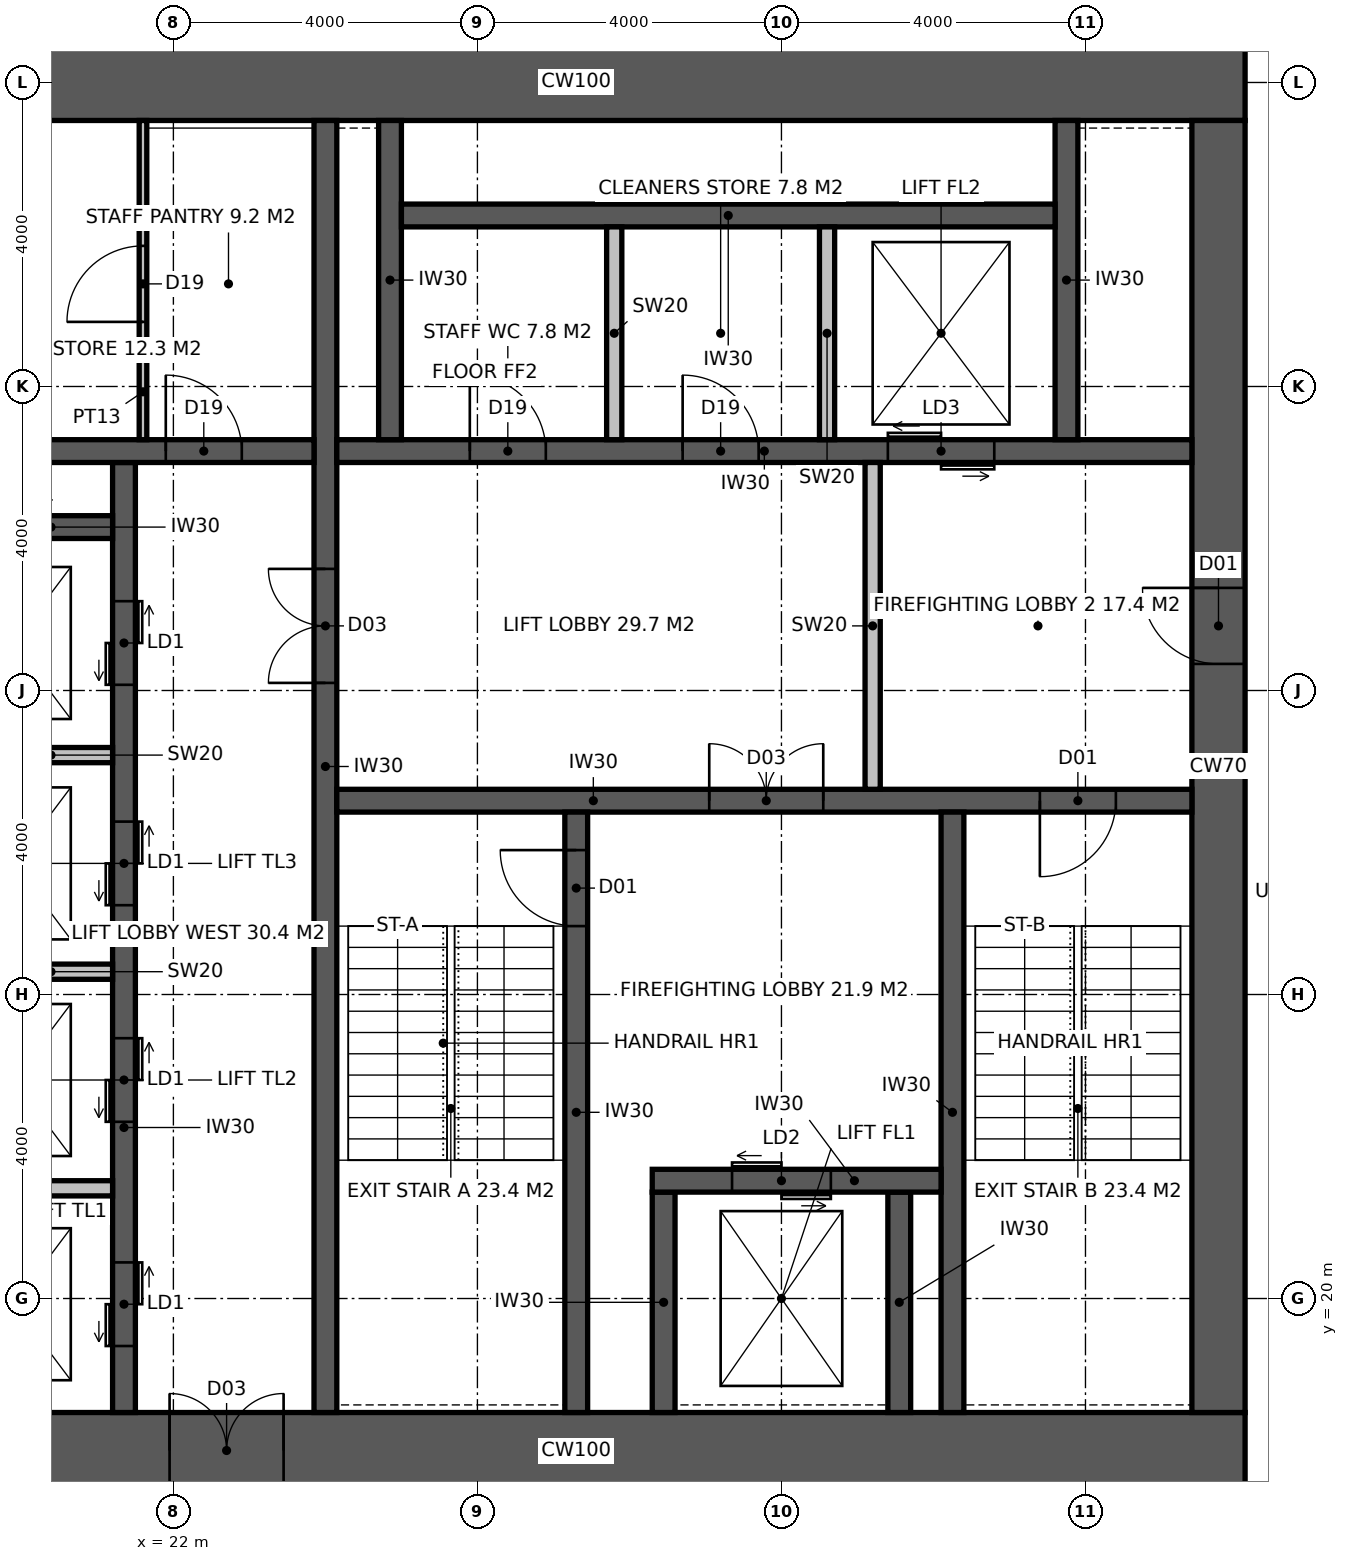
"""IFC4 building model, lengths in metres.
Left out: names, types, materials, properties, quantities, classifications, styles, units other than length and angle.
Written with IfcOpenShell. Run it as: python <this file> out.ifc"""

import sys

from ifc_helpers import new_model, si_unit, direction, frame, frame_2d, origin, place, context, subcontext, project, spatial, rectangle, extrude, element, fill, save


model = new_model("IFC4")
c1 = context("Model", 3, precision=1e-05, world=origin(), true_north=direction((0.0, 1.0)))
c2 = subcontext(c1, "Body", "Model", "MODEL_VIEW")
j1 = project(units=[si_unit("LENGTHUNIT", "METRE"), si_unit("PLANEANGLEUNIT", "RADIAN")], contexts=[c1])
p1 = place(None, origin())
s1 = spatial("IfcSite", under=j1, at=p1, CompositionType="ELEMENT")
p2 = place(p1, origin())
s2 = spatial("IfcBuilding", under=s1, at=p2, CompositionType="ELEMENT")
p3 = place(p2, frame((0.0, 0.0, 274.2)))
s3 = spatial("IfcBuildingStorey", under=s2, at=p3, CompositionType="ELEMENT", Elevation=274.2)
p4 = place(p3, frame((18.5, 18.0, -0.15), z_axis=(0.0, 0.0, 1.0), x_axis=(1.0, 0.0, 0.0)))
e1 = element("IfcWall", 1, at=p4, inside=s3, PredefinedType="SHEAR", context=c2, shape_type="SweptSolid", body=[
    extrude(rectangle(XDim=17.6, YDim=1.0, at=frame_2d((8.8, 0.0))), origin(), (0.0, 0.0, 1.0), 4.0),
])
p5 = place(p4, frame((3.45, 0.0, 0.15)))
e2 = element("IfcOpeningElement", 2, at=p5, cuts=e1, PredefinedType="OPENING", context=c2, shape_type="SweptSolid", body=[
    extrude(rectangle(XDim=1.5, YDim=2.4, at=frame_2d((0.75, 1.2))), frame((0.0, 0.51, 0.0), z_axis=(0.0, -1.0, 0.0), x_axis=(1.0, 0.0, 0.0)), (0.0, 0.0, 1.0), 1.02),
])
p6 = place(p3, frame((18.5, 36.0, -0.15), z_axis=(0.0, 0.0, 1.0), x_axis=(1.0, 0.0, 0.0)))
e3 = element("IfcWall", 3, at=p6, inside=s3, PredefinedType="SHEAR", context=c2, shape_type="SweptSolid", body=[
    extrude(rectangle(XDim=17.6, YDim=1.0, at=frame_2d((8.8, 0.0))), origin(), (0.0, 0.0, 1.0), 4.0),
])
p7 = place(p3, frame((35.75, 18.5, -0.15), z_axis=(0.0, 0.0, 1.0), x_axis=(0.0, 1.0, 0.0)))
e4 = element("IfcWall", 4, at=p7, inside=s3, PredefinedType="SHEAR", context=c2, shape_type="SweptSolid", body=[
    extrude(rectangle(XDim=17.0, YDim=0.7, at=frame_2d((8.5, 0.0))), origin(), (0.0, 0.0, 1.0), 4.0),
])
p8 = place(p7, frame((9.85, 0.0, 0.15)))
e5 = element("IfcOpeningElement", 5, at=p8, cuts=e4, PredefinedType="OPENING", context=c2, shape_type="SweptSolid", body=[
    extrude(rectangle(XDim=1.0, YDim=2.2, at=frame_2d((0.5, 1.1))), frame((0.0, 0.36, 0.0), z_axis=(0.0, -1.0, 0.0), x_axis=(1.0, 0.0, 0.0)), (0.0, 0.0, 1.0), 0.72),
])
p9 = place(p3, frame((24.0, 18.5, -0.15), z_axis=(0.0, 0.0, 1.0), x_axis=(0.0, 1.0, 0.0)))
e6 = element("IfcWall", 6, at=p9, inside=s3, PredefinedType="SHEAR", context=c2, shape_type="SweptSolid", body=[
    extrude(rectangle(XDim=17.0, YDim=0.3, at=frame_2d((8.5, 0.0))), origin(), (0.0, 0.0, 1.0), 4.0),
])
p10 = place(p9, frame((9.6, 0.0, 0.15)))
e7 = element("IfcOpeningElement", 7, at=p10, cuts=e6, PredefinedType="OPENING", context=c2, shape_type="SweptSolid", body=[
    extrude(rectangle(XDim=1.5, YDim=2.4, at=frame_2d((0.75, 1.2))), frame((0.0, 0.16, 0.0), z_axis=(0.0, -1.0, 0.0), x_axis=(1.0, 0.0, 0.0)), (0.0, 0.0, 1.0), 0.32),
])
p11 = place(p3, frame((24.15, 26.55, -0.15), z_axis=(0.0, 0.0, 1.0), x_axis=(1.0, 0.0, 0.0)))
e8 = element("IfcWall", 8, at=p11, inside=s3, PredefinedType="SHEAR", context=c2, shape_type="SweptSolid", body=[
    extrude(rectangle(XDim=11.25, YDim=0.3, at=frame_2d((5.625, 0.0))), origin(), (0.0, 0.0, 1.0), 4.0),
])
p12 = place(p11, frame((9.25, 0.0, 0.15)))
e9 = element("IfcOpeningElement", 9, at=p12, cuts=e8, PredefinedType="OPENING", context=c2, shape_type="SweptSolid", body=[
    extrude(rectangle(XDim=1.0, YDim=2.2, at=frame_2d((0.5, 1.1))), frame((0.0, 0.16, 0.0), z_axis=(0.0, -1.0, 0.0), x_axis=(1.0, 0.0, 0.0)), (0.0, 0.0, 1.0), 0.32),
])
p13 = place(p11, frame((4.9, 0.0, 0.15)))
e10 = element("IfcOpeningElement", 10, at=p13, cuts=e8, PredefinedType="OPENING", context=c2, shape_type="SweptSolid", body=[
    extrude(rectangle(XDim=1.5, YDim=2.4, at=frame_2d((0.75, 1.2))), frame((0.0, 0.16, 0.0), z_axis=(0.0, -1.0, 0.0), x_axis=(1.0, 0.0, 0.0)), (0.0, 0.0, 1.0), 0.32),
])
p14 = place(p3, frame((27.3, 18.5, -0.15), z_axis=(0.0, 0.0, 1.0), x_axis=(0.0, 1.0, 0.0)))
e11 = element("IfcWall", 11, at=p14, inside=s3, PredefinedType="SHEAR", context=c2, shape_type="SweptSolid", body=[
    extrude(rectangle(XDim=7.9, YDim=0.3, at=frame_2d((3.95, 0.0))), origin(), (0.0, 0.0, 1.0), 4.0),
])
p15 = place(p14, frame((6.4, 0.0, 0.15)))
e12 = element("IfcOpeningElement", 12, at=p15, cuts=e11, PredefinedType="OPENING", context=c2, shape_type="SweptSolid", body=[
    extrude(rectangle(XDim=1.0, YDim=2.2, at=frame_2d((0.5, 1.1))), frame((0.0, 0.16, 0.0), z_axis=(0.0, -1.0, 0.0), x_axis=(1.0, 0.0, 0.0)), (0.0, 0.0, 1.0), 0.32),
])
p16 = place(p3, frame((32.25, 18.5, -0.15), z_axis=(0.0, 0.0, 1.0), x_axis=(0.0, 1.0, 0.0)))
e13 = element("IfcWall", 13, at=p16, inside=s3, PredefinedType="SHEAR", context=c2, shape_type="SweptSolid", body=[
    extrude(rectangle(XDim=7.9, YDim=0.3, at=frame_2d((3.95, 0.0))), origin(), (0.0, 0.0, 1.0), 4.0),
])
for number, where, z_axis, x_axis in (
    (14, (28.45, 18.5, -0.15), (0.0, 0.0, 1.0), (0.0, 1.0, 0.0)),
    (15, (31.55, 18.5, -0.15), (0.0, 0.0, 1.0), (0.0, 1.0, 0.0)),
):
    element("IfcWall", number, at=place(p3, frame(where, z_axis=z_axis, x_axis=x_axis)), inside=s3, PredefinedType="SHEAR", context=c2, shape_type="SweptSolid", body=[
        extrude(rectangle(XDim=2.9, YDim=0.3, at=frame_2d((1.45, 0.0))), origin(), (0.0, 0.0, 1.0), 4.0),
    ])
p17 = place(p3, frame((28.3, 21.55, -0.15), z_axis=(0.0, 0.0, 1.0), x_axis=(1.0, 0.0, 0.0)))
e16 = element("IfcWall", 16, at=p17, inside=s3, PredefinedType="SHEAR", context=c2, shape_type="SweptSolid", body=[
    extrude(rectangle(XDim=3.8, YDim=0.3, at=frame_2d((1.9, 0.0))), origin(), (0.0, 0.0, 1.0), 4.0),
])
p18 = place(p17, frame((1.05, 0.0, 0.15)))
e17 = element("IfcOpeningElement", 17, at=p18, cuts=e16, PredefinedType="OPENING", context=c2, shape_type="SweptSolid", body=[
    extrude(rectangle(XDim=1.3, YDim=2.4, at=frame_2d((0.65, 1.2))), frame((0.0, 0.16, 0.0), z_axis=(0.0, -1.0, 0.0), x_axis=(1.0, 0.0, 0.0)), (0.0, 0.0, 1.0), 0.32),
])
p19 = place(p3, frame((24.15, 31.15, -0.15), z_axis=(0.0, 0.0, 1.0), x_axis=(1.0, 0.0, 0.0)))
e18 = element("IfcWall", 18, at=p19, inside=s3, PredefinedType="SHEAR", context=c2, shape_type="SweptSolid", body=[
    extrude(rectangle(XDim=11.25, YDim=0.3, at=frame_2d((5.625, 0.0))), origin(), (0.0, 0.0, 1.0), 4.0),
])
p20 = place(p19, frame((1.75, 0.0, 0.15)))
e19 = element("IfcOpeningElement", 19, at=p20, cuts=e18, PredefinedType="OPENING", context=c2, shape_type="SweptSolid", body=[
    extrude(rectangle(XDim=1.0, YDim=2.2, at=frame_2d((0.5, 1.1))), frame((0.0, 0.16, 0.0), z_axis=(0.0, -1.0, 0.0), x_axis=(1.0, 0.0, 0.0)), (0.0, 0.0, 1.0), 0.32),
])
p21 = place(p19, frame((4.55, 0.0, 0.15)))
e20 = element("IfcOpeningElement", 20, at=p21, cuts=e18, PredefinedType="OPENING", context=c2, shape_type="SweptSolid", body=[
    extrude(rectangle(XDim=1.0, YDim=2.2, at=frame_2d((0.5, 1.1))), frame((0.0, 0.16, 0.0), z_axis=(0.0, -1.0, 0.0), x_axis=(1.0, 0.0, 0.0)), (0.0, 0.0, 1.0), 0.32),
])
p22 = place(p19, frame((7.25, 0.0, 0.15)))
e21 = element("IfcOpeningElement", 21, at=p22, cuts=e18, PredefinedType="OPENING", context=c2, shape_type="SweptSolid", body=[
    extrude(rectangle(XDim=1.4, YDim=2.4, at=frame_2d((0.7, 1.2))), frame((0.0, 0.16, 0.0), z_axis=(0.0, -1.0, 0.0), x_axis=(1.0, 0.0, 0.0)), (0.0, 0.0, 1.0), 0.32),
])
p23 = place(p3, frame((21.35, 18.5, -0.15), z_axis=(0.0, 0.0, 1.0), x_axis=(0.0, 1.0, 0.0)))
e22 = element("IfcWall", 22, at=p23, inside=s3, PredefinedType="SHEAR", context=c2, shape_type="SweptSolid", body=[
    extrude(rectangle(XDim=12.5, YDim=0.3, at=frame_2d((6.25, 0.0))), origin(), (0.0, 0.0, 1.0), 4.0),
])
p24 = place(p23, frame((0.875, 0.0, 0.15)))
e23 = element("IfcOpeningElement", 23, at=p24, cuts=e22, PredefinedType="OPENING", context=c2, shape_type="SweptSolid", body=[
    extrude(rectangle(XDim=1.1, YDim=2.2, at=frame_2d((0.55, 1.1))), frame((0.0, 0.16, 0.0), z_axis=(0.0, -1.0, 0.0), x_axis=(1.0, 0.0, 0.0)), (0.0, 0.0, 1.0), 0.32),
])
p25 = place(p23, frame((3.825, 0.0, 0.15)))
e24 = element("IfcOpeningElement", 24, at=p25, cuts=e22, PredefinedType="OPENING", context=c2, shape_type="SweptSolid", body=[
    extrude(rectangle(XDim=1.1, YDim=2.2, at=frame_2d((0.55, 1.1))), frame((0.0, 0.16, 0.0), z_axis=(0.0, -1.0, 0.0), x_axis=(1.0, 0.0, 0.0)), (0.0, 0.0, 1.0), 0.32),
])
p26 = place(p23, frame((6.675, 0.0, 0.15)))
e25 = element("IfcOpeningElement", 25, at=p26, cuts=e22, PredefinedType="OPENING", context=c2, shape_type="SweptSolid", body=[
    extrude(rectangle(XDim=1.1, YDim=2.2, at=frame_2d((0.55, 1.1))), frame((0.0, 0.16, 0.0), z_axis=(0.0, -1.0, 0.0), x_axis=(1.0, 0.0, 0.0)), (0.0, 0.0, 1.0), 0.32),
])
p27 = place(p23, frame((9.575, 0.0, 0.15)))
e26 = element("IfcOpeningElement", 26, at=p27, cuts=e22, PredefinedType="OPENING", context=c2, shape_type="SweptSolid", body=[
    extrude(rectangle(XDim=1.1, YDim=2.2, at=frame_2d((0.55, 1.1))), frame((0.0, 0.16, 0.0), z_axis=(0.0, -1.0, 0.0), x_axis=(1.0, 0.0, 0.0)), (0.0, 0.0, 1.0), 0.32),
])
p28 = place(p3, frame((18.5, 31.15, -0.15), z_axis=(0.0, 0.0, 1.0), x_axis=(1.0, 0.0, 0.0)))
e27 = element("IfcWall", 27, at=p28, inside=s3, PredefinedType="SHEAR", context=c2, shape_type="SweptSolid", body=[
    extrude(rectangle(XDim=5.35, YDim=0.3, at=frame_2d((2.675, 0.0))), origin(), (0.0, 0.0, 1.0), 4.0),
])
p29 = place(p28, frame((3.4, 0.0, 0.15)))
e28 = element("IfcOpeningElement", 28, at=p29, cuts=e27, PredefinedType="OPENING", context=c2, shape_type="SweptSolid", body=[
    extrude(rectangle(XDim=1.0, YDim=2.2, at=frame_2d((0.5, 1.1))), frame((0.0, 0.16, 0.0), z_axis=(0.0, -1.0, 0.0), x_axis=(1.0, 0.0, 0.0)), (0.0, 0.0, 1.0), 0.32),
])
p30 = place(p3, frame((18.5, 30.15, -0.15), z_axis=(0.0, 0.0, 1.0), x_axis=(1.0, 0.0, 0.0)))
e29 = element("IfcWall", 29, at=p30, inside=s3, PredefinedType="SHEAR", context=c2, shape_type="SweptSolid", body=[
    extrude(rectangle(XDim=2.7, YDim=0.3, at=frame_2d((1.35, 0.0))), origin(), (0.0, 0.0, 1.0), 4.0),
])
for number, where, z_axis, x_axis in (
    (30, (24.85, 31.3, -0.15), (0.0, 0.0, 1.0), (0.0, 1.0, 0.0)),
    (31, (33.75, 31.3, -0.15), (0.0, 0.0, 1.0), (0.0, 1.0, 0.0)),
):
    element("IfcWall", number, at=place(p3, frame(where, z_axis=z_axis, x_axis=x_axis)), inside=s3, PredefinedType="SHEAR", context=c2, shape_type="SweptSolid", body=[
        extrude(rectangle(XDim=4.2, YDim=0.3, at=frame_2d((2.1, 0.0))), origin(), (0.0, 0.0, 1.0), 4.0),
    ])
p31 = place(p3, frame((25.0, 34.25, -0.15), z_axis=(0.0, 0.0, 1.0), x_axis=(1.0, 0.0, 0.0)))
e32 = element("IfcWall", 32, at=p31, inside=s3, PredefinedType="SHEAR", context=c2, shape_type="SweptSolid", body=[
    extrude(rectangle(XDim=8.6, YDim=0.3, at=frame_2d((4.3, 0.0))), origin(), (0.0, 0.0, 1.0), 4.0),
])
p32 = place(p3, frame((27.8, 31.3, 0.0), z_axis=(0.0, 0.0, 1.0), x_axis=(0.0, 1.0, 0.0)))
e33 = element("IfcWall", 33, at=p32, inside=s3, PredefinedType="SOLIDWALL", context=c2, shape_type="SweptSolid", body=[
    extrude(rectangle(XDim=2.8, YDim=0.2, at=frame_2d((1.4, 0.0))), origin(), (0.0, 0.0, 1.0), 3.85),
])
p33 = place(p3, frame((30.6, 31.3, -0.15), z_axis=(0.0, 0.0, 1.0), x_axis=(0.0, 1.0, 0.0)))
e34 = element("IfcWall", 34, at=p33, inside=s3, PredefinedType="SOLIDWALL", context=c2, shape_type="SweptSolid", body=[
    extrude(rectangle(XDim=2.8, YDim=0.2, at=frame_2d((1.4, 0.0))), origin(), (0.0, 0.0, 1.0), 4.0),
])
for number, where, z_axis, x_axis in (
    (35, (18.5, 21.45, -0.15), (0.0, 0.0, 1.0), (1.0, 0.0, 0.0)),
    (36, (18.5, 24.3, -0.15), (0.0, 0.0, 1.0), (1.0, 0.0, 0.0)),
    (37, (18.5, 27.15, -0.15), (0.0, 0.0, 1.0), (1.0, 0.0, 0.0)),
):
    element("IfcWall", number, at=place(p3, frame(where, z_axis=z_axis, x_axis=x_axis)), inside=s3, PredefinedType="SOLIDWALL", context=c2, shape_type="SweptSolid", body=[
        extrude(rectangle(XDim=2.7, YDim=0.2, at=frame_2d((1.35, 0.0))), origin(), (0.0, 0.0, 1.0), 4.0),
    ])
p34 = place(p3, frame((31.2, 26.7, 0.0), z_axis=(0.0, 0.0, 1.0), x_axis=(0.0, 1.0, 0.0)))
e38 = element("IfcWall", 38, at=p34, inside=s3, PredefinedType="SOLIDWALL", context=c2, shape_type="SweptSolid", body=[
    extrude(rectangle(XDim=4.3, YDim=0.2, at=frame_2d((2.15, 0.0))), origin(), (0.0, 0.0, 1.0), 3.85),
])
p35 = place(p3, frame((21.6, 31.3, 0.0), z_axis=(0.0, 0.0, 1.0), x_axis=(0.0, 1.0, 0.0)))
e39 = element("IfcWall", 39, at=p35, inside=s3, PredefinedType="PARTITIONING", context=c2, shape_type="SweptSolid", body=[
    extrude(rectangle(XDim=4.2, YDim=0.1, at=frame_2d((2.1, 0.0))), origin(), (0.0, 0.0, 1.0), 3.85),
])
p36 = place(p35, frame((1.55, 0.0, 0.0)))
e40 = element("IfcOpeningElement", 40, at=p36, cuts=e39, PredefinedType="OPENING", context=c2, shape_type="SweptSolid", body=[
    extrude(rectangle(XDim=1.0, YDim=2.2, at=frame_2d((0.5, 1.1))), frame((0.0, 0.06, 0.0), z_axis=(0.0, -1.0, 0.0), x_axis=(1.0, 0.0, 0.0)), (0.0, 0.0, 1.0), 0.12),
])
p37 = place(p15, origin())
e41 = element("IfcDoor", 41, at=p37, inside=s3, OperationType="SINGLE_SWING_RIGHT", PredefinedType="DOOR", context=c2, shape_type="SweptSolid", body=[
    extrude(rectangle(XDim=1.0, YDim=2.2, at=frame_2d((0.5, 1.1))), frame((0.0, 0.025, 0.0), z_axis=(0.0, -1.0, 0.0), x_axis=(1.0, 0.0, 0.0)), (0.0, 0.0, 1.0), 0.05),
])
fill(e12, e41)
p38 = place(p12, frame((1.0, 0.0, 0.0), z_axis=(0.0, 0.0, 1.0), x_axis=(-1.0, 0.0, 0.0)))
e42 = element("IfcDoor", 42, at=p38, inside=s3, OperationType="SINGLE_SWING_RIGHT", PredefinedType="DOOR", context=c2, shape_type="SweptSolid", body=[
    extrude(rectangle(XDim=1.0, YDim=2.2, at=frame_2d((0.5, 1.1))), frame((0.0, 0.025, 0.0), z_axis=(0.0, -1.0, 0.0), x_axis=(1.0, 0.0, 0.0)), (0.0, 0.0, 1.0), 0.05),
])
fill(e9, e42)
p39 = place(p8, origin())
e43 = element("IfcDoor", 43, at=p39, inside=s3, OperationType="SINGLE_SWING_RIGHT", PredefinedType="DOOR", context=c2, shape_type="SweptSolid", body=[
    extrude(rectangle(XDim=1.0, YDim=2.2, at=frame_2d((0.5, 1.1))), frame((0.0, 0.025, 0.0), z_axis=(0.0, -1.0, 0.0), x_axis=(1.0, 0.0, 0.0)), (0.0, 0.0, 1.0), 0.05),
])
fill(e5, e43)
p40 = place(p13, origin())
e44 = element("IfcDoor", 44, at=p40, inside=s3, OperationType="DOUBLE_DOOR_DOUBLE_SWING", PredefinedType="DOOR", context=c2, shape_type="SweptSolid", body=[
    extrude(rectangle(XDim=1.5, YDim=2.4, at=frame_2d((0.75, 1.2))), frame((0.0, 0.025, 0.0), z_axis=(0.0, -1.0, 0.0), x_axis=(1.0, 0.0, 0.0)), (0.0, 0.0, 1.0), 0.05),
])
fill(e10, e44)
p41 = place(p10, origin())
e45 = element("IfcDoor", 45, at=p41, inside=s3, OperationType="DOUBLE_DOOR_DOUBLE_SWING", PredefinedType="DOOR", context=c2, shape_type="SweptSolid", body=[
    extrude(rectangle(XDim=1.5, YDim=2.4, at=frame_2d((0.75, 1.2))), frame((0.0, 0.025, 0.0), z_axis=(0.0, -1.0, 0.0), x_axis=(1.0, 0.0, 0.0)), (0.0, 0.0, 1.0), 0.05),
])
fill(e7, e45)
p42 = place(p29, origin())
e46 = element("IfcDoor", 46, at=p42, inside=s3, OperationType="SINGLE_SWING_LEFT", PredefinedType="DOOR", context=c2, shape_type="SweptSolid", body=[
    extrude(rectangle(XDim=1.0, YDim=2.2, at=frame_2d((0.5, 1.1))), frame((0.0, 0.025, 0.0), z_axis=(0.0, -1.0, 0.0), x_axis=(1.0, 0.0, 0.0)), (0.0, 0.0, 1.0), 0.05),
])
fill(e28, e46)
p43 = place(p36, origin())
e47 = element("IfcDoor", 47, at=p43, inside=s3, OperationType="SINGLE_SWING_LEFT", PredefinedType="DOOR", context=c2, shape_type="SweptSolid", body=[
    extrude(rectangle(XDim=1.0, YDim=2.2, at=frame_2d((0.5, 1.1))), frame((0.0, 0.025, 0.0), z_axis=(0.0, -1.0, 0.0), x_axis=(1.0, 0.0, 0.0)), (0.0, 0.0, 1.0), 0.05),
])
fill(e40, e47)
p44 = place(p20, origin())
e48 = element("IfcDoor", 48, at=p44, inside=s3, OperationType="SINGLE_SWING_LEFT", PredefinedType="DOOR", context=c2, shape_type="SweptSolid", body=[
    extrude(rectangle(XDim=1.0, YDim=2.2, at=frame_2d((0.5, 1.1))), frame((0.0, 0.025, 0.0), z_axis=(0.0, -1.0, 0.0), x_axis=(1.0, 0.0, 0.0)), (0.0, 0.0, 1.0), 0.05),
])
fill(e19, e48)
p45 = place(p21, origin())
e49 = element("IfcDoor", 49, at=p45, inside=s3, OperationType="SINGLE_SWING_LEFT", PredefinedType="DOOR", context=c2, shape_type="SweptSolid", body=[
    extrude(rectangle(XDim=1.0, YDim=2.2, at=frame_2d((0.5, 1.1))), frame((0.0, 0.025, 0.0), z_axis=(0.0, -1.0, 0.0), x_axis=(1.0, 0.0, 0.0)), (0.0, 0.0, 1.0), 0.05),
])
fill(e20, e49)
p46 = place(p5, origin())
e50 = element("IfcDoor", 50, at=p46, inside=s3, OperationType="DOUBLE_DOOR_DOUBLE_SWING", PredefinedType="DOOR", context=c2, shape_type="SweptSolid", body=[
    extrude(rectangle(XDim=1.5, YDim=2.4, at=frame_2d((0.75, 1.2))), frame((0.0, 0.025, 0.0), z_axis=(0.0, -1.0, 0.0), x_axis=(1.0, 0.0, 0.0)), (0.0, 0.0, 1.0), 0.05),
])
fill(e2, e50)
p47 = place(p18, origin())
e51 = element("IfcDoor", 51, at=p47, inside=s3, OperationType="DOUBLE_DOOR_SLIDING", PredefinedType="DOOR", context=c2, shape_type="SweptSolid", body=[
    extrude(rectangle(XDim=1.3, YDim=2.4, at=frame_2d((0.65, 1.2))), frame((0.0, 0.025, 0.0), z_axis=(0.0, -1.0, 0.0), x_axis=(1.0, 0.0, 0.0)), (0.0, 0.0, 1.0), 0.05),
])
fill(e17, e51)
p48 = place(p22, origin())
e52 = element("IfcDoor", 52, at=p48, inside=s3, OperationType="DOUBLE_DOOR_SLIDING", PredefinedType="DOOR", context=c2, shape_type="SweptSolid", body=[
    extrude(rectangle(XDim=1.4, YDim=2.4, at=frame_2d((0.7, 1.2))), frame((0.0, 0.025, 0.0), z_axis=(0.0, -1.0, 0.0), x_axis=(1.0, 0.0, 0.0)), (0.0, 0.0, 1.0), 0.05),
])
fill(e21, e52)
p49 = place(p24, origin())
e53 = element("IfcDoor", 53, at=p49, inside=s3, OperationType="DOUBLE_DOOR_SLIDING", PredefinedType="DOOR", context=c2, shape_type="SweptSolid", body=[
    extrude(rectangle(XDim=1.1, YDim=2.2, at=frame_2d((0.55, 1.1))), frame((0.0, 0.025, 0.0), z_axis=(0.0, -1.0, 0.0), x_axis=(1.0, 0.0, 0.0)), (0.0, 0.0, 1.0), 0.05),
])
fill(e23, e53)
p50 = place(p25, origin())
e54 = element("IfcDoor", 54, at=p50, inside=s3, OperationType="DOUBLE_DOOR_SLIDING", PredefinedType="DOOR", context=c2, shape_type="SweptSolid", body=[
    extrude(rectangle(XDim=1.1, YDim=2.2, at=frame_2d((0.55, 1.1))), frame((0.0, 0.025, 0.0), z_axis=(0.0, -1.0, 0.0), x_axis=(1.0, 0.0, 0.0)), (0.0, 0.0, 1.0), 0.05),
])
fill(e24, e54)
p51 = place(p26, origin())
e55 = element("IfcDoor", 55, at=p51, inside=s3, OperationType="DOUBLE_DOOR_SLIDING", PredefinedType="DOOR", context=c2, shape_type="SweptSolid", body=[
    extrude(rectangle(XDim=1.1, YDim=2.2, at=frame_2d((0.55, 1.1))), frame((0.0, 0.025, 0.0), z_axis=(0.0, -1.0, 0.0), x_axis=(1.0, 0.0, 0.0)), (0.0, 0.0, 1.0), 0.05),
])
fill(e25, e55)
p52 = place(p27, origin())
e56 = element("IfcDoor", 56, at=p52, inside=s3, OperationType="DOUBLE_DOOR_SLIDING", PredefinedType="DOOR", context=c2, shape_type="SweptSolid", body=[
    extrude(rectangle(XDim=1.1, YDim=2.2, at=frame_2d((0.55, 1.1))), frame((0.0, 0.025, 0.0), z_axis=(0.0, -1.0, 0.0), x_axis=(1.0, 0.0, 0.0)), (0.0, 0.0, 1.0), 0.05),
])
fill(e26, e56)
save(model, sys.argv[1])
